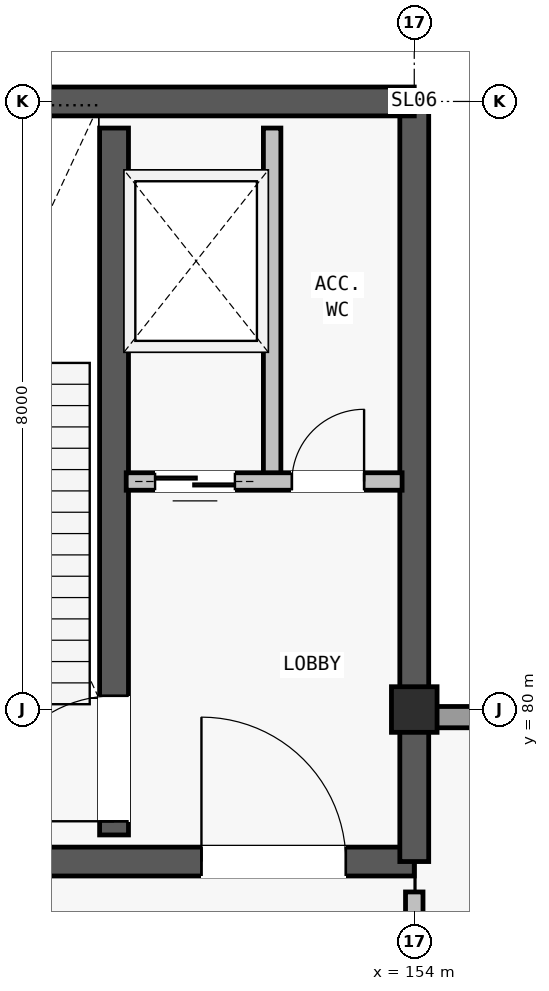
"""IFC4 building model, lengths in metres.
Left out: names, types, materials, properties, quantities, classifications, styles, units other than length and angle.
Written with IfcOpenShell. Run it as: python <this file> out.ifc"""

import sys

from ifc_helpers import new_model, si_unit, direction, frame, frame_2d, origin, origin_2d, place, context, subcontext, project, spatial, rectangle, extrude, element, fill, save


model = new_model("IFC4")
c1 = context("Model", 3, precision=1e-05, world=origin(), true_north=direction((0.0, 1.0)))
c2 = subcontext(c1, "Body", "Model", "MODEL_VIEW")
j1 = project(units=[si_unit("LENGTHUNIT", "METRE"), si_unit("PLANEANGLEUNIT", "RADIAN")], contexts=[c1])
p1 = place(None, origin())
s1 = spatial("IfcSite", under=j1, at=p1, CompositionType="ELEMENT")
p2 = place(p1, origin())
s2 = spatial("IfcBuilding", under=s1, at=p2, CompositionType="ELEMENT")
p3 = place(p2, frame((0.0, 0.0, 5.6)))
s3 = spatial("IfcBuildingStorey", under=s2, at=p3, CompositionType="ELEMENT", Elevation=5.6)
p4 = place(p3, frame((154.0, 80.0, 0.0), z_axis=(0.0, 0.0, 1.0), x_axis=(1.0, 0.0, 0.0)))
e1 = element("IfcColumn", 1, at=p4, inside=s3, PredefinedType="COLUMN", context=c2, shape_type="SweptSolid", body=[
    extrude(rectangle(XDim=0.6, YDim=0.6, at=origin_2d()), origin(), (0.0, 0.0, 1.0), 3.9),
])
p5 = place(p3, frame((161.715, 79.9, 0.0), z_axis=(0.0, 0.0, 1.0), x_axis=(-1.0, 0.0, 0.0)))
e2 = element("IfcWall", 2, at=p5, inside=s3, PredefinedType="STANDARD", context=c2, shape_type="SweptSolid", body=[
    extrude(rectangle(XDim=7.575, YDim=0.28, at=frame_2d((3.788, 0.0))), origin(), (0.0, 0.0, 1.0), 2.48),
])
p6 = place(p3, frame((146.0, 78.0, 0.0), z_axis=(0.0, 0.0, 1.0), x_axis=(1.0, 0.0, 0.0)))
e3 = element("IfcWall", 3, at=p6, inside=s3, PredefinedType="SHEAR", context=c2, shape_type="SweptSolid", body=[
    extrude(rectangle(XDim=8.0, YDim=0.38, at=frame_2d((4.0, 0.0))), origin(), (0.0, 0.0, 1.0), 2.4),
])
p7 = place(p6, frame((5.2, 0.0, 0.0)))
e4 = element("IfcOpeningElement", 4, at=p7, cuts=e3, PredefinedType="OPENING", context=c2, shape_type="SweptSolid", body=[
    extrude(rectangle(XDim=1.9, YDim=2.3, at=frame_2d((0.95, 1.15))), frame((0.0, 0.2, 0.0), z_axis=(0.0, -1.0, 0.0), x_axis=(1.0, 0.0, 0.0)), (0.0, 0.0, 1.0), 0.4),
])
p8 = place(p3, frame((154.0, 78.0, 0.0), z_axis=(0.0, 0.0, 1.0), x_axis=(0.0, 1.0, 0.0)))
e5 = element("IfcWall", 5, at=p8, inside=s3, PredefinedType="SHEAR", context=c2, shape_type="SweptSolid", body=[
    extrude(rectangle(XDim=10.0, YDim=0.38, at=frame_2d((5.0, 0.0))), origin(), (0.0, 0.0, 1.0), 2.4),
])
p9 = place(p3, frame((154.0, 88.0, 0.0), z_axis=(0.0, 0.0, 1.0), x_axis=(-1.0, 0.0, 0.0)))
e6 = element("IfcWall", 6, at=p9, inside=s3, PredefinedType="SHEAR", context=c2, shape_type="SweptSolid", body=[
    extrude(rectangle(XDim=8.0, YDim=0.38, at=frame_2d((4.0, 0.0))), origin(), (0.0, 0.0, 1.0), 2.4),
])
p10 = place(p3, frame((150.05, 78.35, 0.0), z_axis=(0.0, 0.0, 1.0), x_axis=(0.0, 1.0, 0.0)))
e7 = element("IfcWall", 7, at=p10, inside=s3, PredefinedType="SHEAR", context=c2, shape_type="SweptSolid", body=[
    extrude(rectangle(XDim=9.3, YDim=0.38, at=frame_2d((4.65, 0.0))), origin(), (0.0, 0.0, 1.0), 2.4),
])
p11 = place(p10, frame((0.18, 0.0, 0.0)))
e8 = element("IfcOpeningElement", 8, at=p11, cuts=e7, PredefinedType="OPENING", context=c2, shape_type="SweptSolid", body=[
    extrude(rectangle(XDim=1.65, YDim=2.2, at=frame_2d((0.825, 1.1))), frame((0.0, 0.2, 0.0), z_axis=(0.0, -1.0, 0.0), x_axis=(1.0, 0.0, 0.0)), (0.0, 0.0, 1.0), 0.4),
])
p12 = place(p3, frame((152.13, 83.0, 0.0), z_axis=(0.0, 0.0, 1.0), x_axis=(0.0, 1.0, 0.0)))
e9 = element("IfcWall", 9, at=p12, inside=s3, PredefinedType="PARTITIONING", context=c2, shape_type="SweptSolid", body=[
    extrude(rectangle(XDim=4.65, YDim=0.23, at=frame_2d((2.325, 0.0))), origin(), (0.0, 0.0, 1.0), 2.4),
])
p13 = place(p3, frame((150.21, 83.0, 0.0), z_axis=(0.0, 0.0, 1.0), x_axis=(1.0, 0.0, 0.0)))
e10 = element("IfcWall", 10, at=p13, inside=s3, PredefinedType="PARTITIONING", context=c2, shape_type="SweptSolid", body=[
    extrude(rectangle(XDim=3.63, YDim=0.23, at=frame_2d((1.815, 0.0))), origin(), (0.0, 0.0, 1.0), 2.4),
])
p14 = place(p13, frame((0.38, 0.0, 0.0)))
e11 = element("IfcOpeningElement", 11, at=p14, cuts=e10, PredefinedType="OPENING", context=c2, shape_type="SweptSolid", body=[
    extrude(rectangle(XDim=1.05, YDim=2.15, at=frame_2d((0.525, 1.075))), frame((0.0, 0.125, 0.0), z_axis=(0.0, -1.0, 0.0), x_axis=(1.0, 0.0, 0.0)), (0.0, 0.0, 1.0), 0.25),
])
p15 = place(p13, frame((2.18, 0.0, 0.0)))
e12 = element("IfcOpeningElement", 12, at=p15, cuts=e10, PredefinedType="OPENING", context=c2, shape_type="SweptSolid", body=[
    extrude(rectangle(XDim=0.95, YDim=2.1, at=frame_2d((0.475, 1.05))), frame((0.0, 0.125, 0.0), z_axis=(0.0, -1.0, 0.0), x_axis=(1.0, 0.0, 0.0)), (0.0, 0.0, 1.0), 0.25),
])
p16 = place(p3, frame((154.0, 41.0, 0.0), z_axis=(0.0, 0.0, 1.0), x_axis=(0.0, 1.0, 0.0)))
e13 = element("IfcWall", 13, at=p16, inside=s3, PredefinedType="PARTITIONING", context=c2, shape_type="SweptSolid", body=[
    extrude(rectangle(XDim=36.6, YDim=0.23, at=frame_2d((18.3, 0.0))), origin(), (0.0, 0.0, 1.0), 2.48),
])
p17 = place(p16, frame((10.5, 0.0, 0.0)))
e14 = element("IfcOpeningElement", 14, at=p17, cuts=e13, PredefinedType="OPENING", context=c2, shape_type="SweptSolid", body=[
    extrude(rectangle(XDim=1.2, YDim=2.2, at=frame_2d((0.6, 1.1))), frame((0.0, 0.125, 0.0), z_axis=(0.0, -1.0, 0.0), x_axis=(1.0, 0.0, 0.0)), (0.0, 0.0, 1.0), 0.25),
])
p18 = place(p16, frame((26.5, 0.0, 0.0)))
e15 = element("IfcOpeningElement", 15, at=p18, cuts=e13, PredefinedType="OPENING", context=c2, shape_type="SweptSolid", body=[
    extrude(rectangle(XDim=0.98, YDim=2.1, at=frame_2d((0.49, 1.05))), frame((0.0, 0.125, 0.0), z_axis=(0.0, -1.0, 0.0), x_axis=(1.0, 0.0, 0.0)), (0.0, 0.0, 1.0), 0.25),
])
p19 = place(p7, origin())
e16 = element("IfcDoor", 16, at=p19, inside=s3, OperationType="SINGLE_SWING_LEFT", PredefinedType="DOOR", context=c2, shape_type="SweptSolid", body=[
    extrude(rectangle(XDim=1.9, YDim=2.3, at=frame_2d((0.95, 1.15))), frame((0.0, 0.025, 0.0), z_axis=(0.0, -1.0, 0.0), x_axis=(1.0, 0.0, 0.0)), (0.0, 0.0, 1.0), 0.05),
])
fill(e4, e16)
p20 = place(p11, origin())
e17 = element("IfcDoor", 17, at=p20, inside=s3, OperationType="SINGLE_SWING_LEFT", PredefinedType="DOOR", context=c2, shape_type="SweptSolid", body=[
    extrude(rectangle(XDim=1.65, YDim=2.2, at=frame_2d((0.825, 1.1))), frame((0.0, 0.025, 0.0), z_axis=(0.0, -1.0, 0.0), x_axis=(1.0, 0.0, 0.0)), (0.0, 0.0, 1.0), 0.05),
])
fill(e8, e17)
p21 = place(p14, origin())
e18 = element("IfcDoor", 18, at=p21, inside=s3, OperationType="SLIDING_TO_LEFT", PredefinedType="DOOR", context=c2, shape_type="SweptSolid", body=[
    extrude(rectangle(XDim=1.05, YDim=2.15, at=frame_2d((0.525, 1.075))), frame((0.0, 0.025, 0.0), z_axis=(0.0, -1.0, 0.0), x_axis=(1.0, 0.0, 0.0)), (0.0, 0.0, 1.0), 0.05),
])
fill(e11, e18)
p22 = place(p15, origin())
e19 = element("IfcDoor", 19, at=p22, inside=s3, OperationType="SINGLE_SWING_RIGHT", PredefinedType="DOOR", context=c2, shape_type="SweptSolid", body=[
    extrude(rectangle(XDim=0.95, YDim=2.1, at=frame_2d((0.475, 1.05))), frame((0.0, 0.025, 0.0), z_axis=(0.0, -1.0, 0.0), x_axis=(1.0, 0.0, 0.0)), (0.0, 0.0, 1.0), 0.05),
])
fill(e12, e19)
save(model, sys.argv[1])
